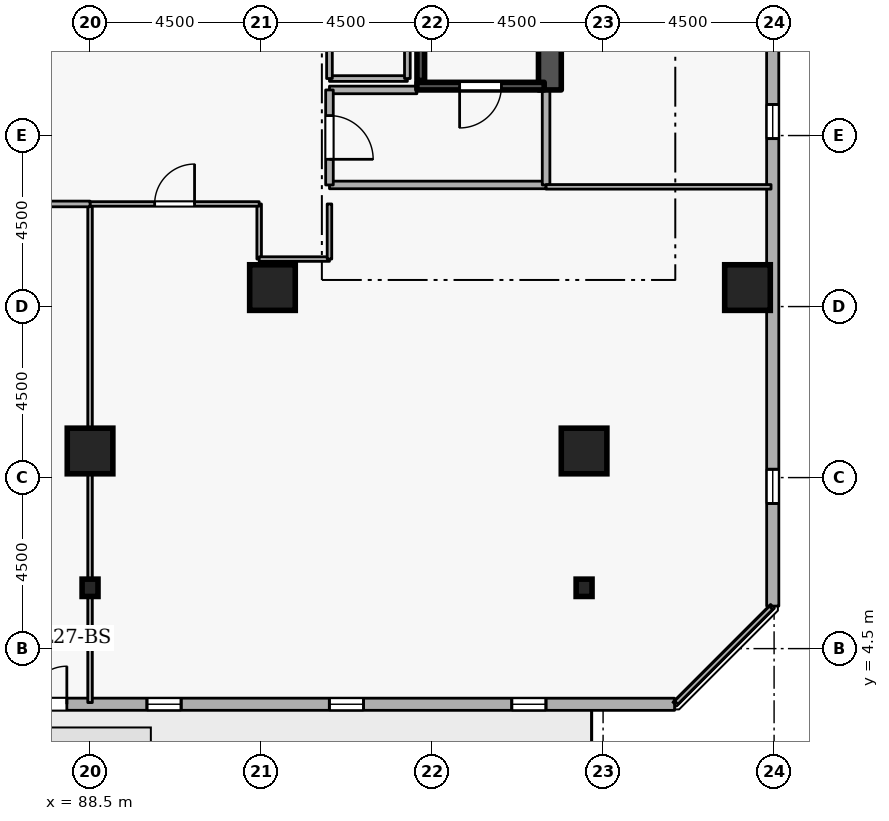
"""IFC4 building model, lengths in metres.
Left out: names, types, materials, properties, quantities, classifications, styles, units other than length and angle.
Written with IfcOpenShell. Run it as: python <this file> out.ifc"""

import sys

from ifc_helpers import new_model, si_unit, direction, frame, frame_2d, origin, origin_2d, place, context, subcontext, project, spatial, rectangle, i_section, extrude, element, fill, save


model = new_model("IFC4")
c1 = context("Model", 3, precision=1e-05, world=origin(), true_north=direction((0.0, 1.0)))
c2 = subcontext(c1, "Body", "Model", "MODEL_VIEW")
j1 = project(units=[si_unit("LENGTHUNIT", "METRE"), si_unit("PLANEANGLEUNIT", "RADIAN")], contexts=[c1])
p1 = place(None, origin())
s1 = spatial("IfcSite", under=j1, at=p1, CompositionType="ELEMENT")
p2 = place(p1, origin())
s2 = spatial("IfcBuilding", under=s1, at=p2, CompositionType="ELEMENT")
p3 = place(p2, frame((0.0, 0.0, 105.3)))
s3 = spatial("IfcBuildingStorey", under=s2, at=p3, CompositionType="ELEMENT", Elevation=105.3)
p4 = place(p3, frame((100.6, 19.2, 0.0), z_axis=(0.0, 0.0, 1.0), x_axis=(0.0, 1.0, 0.0)))
e1 = element("IfcWall", 1, at=p4, inside=s3, PredefinedType="SHEAR", context=c2, shape_type="SweptSolid", body=[
    extrude(rectangle(XDim=15.6, YDim=0.6, at=frame_2d((7.8, 0.0))), origin(), (0.0, 0.0, 1.0), 3.6),
])
for number, where, z_axis, x_axis in (
    (2, (105.8, 14.0, 0.0), (0.0, 0.0, 1.0), (1.0, 0.0, 0.0)),
    (3, (101.5, 9.7, 0.0), (0.0, 0.0, 1.0), (1.0, 0.0, 0.0)),
    (4, (88.5, 9.7, 0.0), (0.0, 0.0, 1.0), (1.0, 0.0, 0.0)),
    (5, (93.3, 14.0, 0.0), (0.0, 0.0, 1.0), (1.0, 0.0, 0.0)),
):
    element("IfcColumn", number, at=place(p3, frame(where, z_axis=z_axis, x_axis=x_axis)), inside=s3, PredefinedType="COLUMN", context=c2, shape_type="SweptSolid", body=[
        extrude(rectangle(XDim=1.2, YDim=1.2, at=origin_2d()), origin(), (0.0, 0.0, 1.0), 3.6),
    ])
for number, where, z_axis, x_axis in (
    (6, (101.5, 6.1, 0.0), (0.0, 0.0, 1.0), (1.0, 0.0, 0.0)),
    (7, (88.5, 6.1, 0.0), (0.0, 0.0, 1.0), (1.0, 0.0, 0.0)),
):
    element("IfcColumn", number, at=place(p3, frame(where, z_axis=z_axis, x_axis=x_axis)), inside=s3, PredefinedType="COLUMN", context=c2, shape_type="SweptSolid", body=[
        extrude(i_section(OverallWidth=0.418, OverallDepth=0.456, WebThickness=0.042, FlangeThickness=0.067, FilletRadius=0.015, at=origin_2d()), origin(), (0.0, 0.0, 1.0), 3.6),
    ])
p5 = place(p3, frame((68.097, 3.039, 0.0), z_axis=(0.0, 0.0, 1.0), x_axis=(0.999999996067, -8.8693006e-05, 0.0)))
e8 = element("IfcWall", 8, at=p5, inside=s3, PredefinedType="STANDARD", context=c2, shape_type="SweptSolid", body=[
    extrude(rectangle(XDim=35.784, YDim=0.32, at=frame_2d((17.892, 0.0))), origin(), (0.0, 0.0, 1.0), 2.7),
])
p6 = place(p5, frame((18.792, 0.0, 0.0)))
e9 = element("IfcOpeningElement", 9, at=p6, cuts=e8, PredefinedType="OPENING", context=c2, shape_type="SweptSolid", body=[
    extrude(rectangle(XDim=1.0, YDim=2.08, at=frame_2d((0.5, 1.04))), frame((0.0, 0.17, 0.0), z_axis=(0.0, -1.0, 0.0), x_axis=(1.0, 0.0, 0.0)), (0.0, 0.0, 1.0), 0.34),
])
p7 = place(p5, frame((2.7, 0.0, 0.72)))
e10 = element("IfcOpeningElement", 10, at=p7, cuts=e8, PredefinedType="OPENING", context=c2, shape_type="SweptSolid", body=[
    extrude(rectangle(XDim=0.9, YDim=1.75, at=frame_2d((0.45, 0.875))), frame((0.0, 0.17, 0.0), z_axis=(0.0, -1.0, 0.0), x_axis=(1.0, 0.0, 0.0)), (0.0, 0.0, 1.0), 0.34),
])
p8 = place(p5, frame((7.5, 0.0, 0.72)))
e11 = element("IfcOpeningElement", 11, at=p8, cuts=e8, PredefinedType="OPENING", context=c2, shape_type="SweptSolid", body=[
    extrude(rectangle(XDim=0.9, YDim=1.75, at=frame_2d((0.45, 0.875))), frame((0.0, 0.17, 0.0), z_axis=(0.0, -1.0, 0.0), x_axis=(1.0, 0.0, 0.0)), (0.0, 0.0, 1.0), 0.34),
])
p9 = place(p5, frame((12.3, 0.0, 0.72)))
e12 = element("IfcOpeningElement", 12, at=p9, cuts=e8, PredefinedType="OPENING", context=c2, shape_type="SweptSolid", body=[
    extrude(rectangle(XDim=0.9, YDim=1.75, at=frame_2d((0.45, 0.875))), frame((0.0, 0.17, 0.0), z_axis=(0.0, -1.0, 0.0), x_axis=(1.0, 0.0, 0.0)), (0.0, 0.0, 1.0), 0.34),
])
p10 = place(p5, frame((17.1, 0.0, 0.72)))
e13 = element("IfcOpeningElement", 13, at=p10, cuts=e8, PredefinedType="OPENING", context=c2, shape_type="SweptSolid", body=[
    extrude(rectangle(XDim=0.9, YDim=1.75, at=frame_2d((0.45, 0.875))), frame((0.0, 0.17, 0.0), z_axis=(0.0, -1.0, 0.0), x_axis=(1.0, 0.0, 0.0)), (0.0, 0.0, 1.0), 0.34),
])
p11 = place(p5, frame((21.9, 0.0, 0.72)))
e14 = element("IfcOpeningElement", 14, at=p11, cuts=e8, PredefinedType="OPENING", context=c2, shape_type="SweptSolid", body=[
    extrude(rectangle(XDim=0.9, YDim=1.75, at=frame_2d((0.45, 0.875))), frame((0.0, 0.17, 0.0), z_axis=(0.0, -1.0, 0.0), x_axis=(1.0, 0.0, 0.0)), (0.0, 0.0, 1.0), 0.34),
])
p12 = place(p5, frame((26.7, 0.0, 0.72)))
e15 = element("IfcOpeningElement", 15, at=p12, cuts=e8, PredefinedType="OPENING", context=c2, shape_type="SweptSolid", body=[
    extrude(rectangle(XDim=0.9, YDim=1.75, at=frame_2d((0.45, 0.875))), frame((0.0, 0.17, 0.0), z_axis=(0.0, -1.0, 0.0), x_axis=(1.0, 0.0, 0.0)), (0.0, 0.0, 1.0), 0.34),
])
p13 = place(p5, frame((31.5, 0.0, 0.72)))
e16 = element("IfcOpeningElement", 16, at=p13, cuts=e8, PredefinedType="OPENING", context=c2, shape_type="SweptSolid", body=[
    extrude(rectangle(XDim=0.9, YDim=1.75, at=frame_2d((0.45, 0.875))), frame((0.0, 0.17, 0.0), z_axis=(0.0, -1.0, 0.0), x_axis=(1.0, 0.0, 0.0)), (0.0, 0.0, 1.0), 0.34),
])
p14 = place(p3, frame((106.465, 5.619, 0.0), z_axis=(0.0, 0.0, 1.0), x_axis=(-8.8693006e-05, 0.999999996067, 0.0)))
e17 = element("IfcWall", 17, at=p14, inside=s3, PredefinedType="STANDARD", context=c2, shape_type="SweptSolid", body=[
    extrude(rectangle(XDim=35.784, YDim=0.32, at=frame_2d((17.892, 0.0))), origin(), (0.0, 0.0, 1.0), 2.7),
])
p15 = place(p14, frame((2.7, 0.0, 0.72)))
e18 = element("IfcOpeningElement", 18, at=p15, cuts=e17, PredefinedType="OPENING", context=c2, shape_type="SweptSolid", body=[
    extrude(rectangle(XDim=0.9, YDim=1.75, at=frame_2d((0.45, 0.875))), frame((0.0, 0.17, 0.0), z_axis=(0.0, -1.0, 0.0), x_axis=(1.0, 0.0, 0.0)), (0.0, 0.0, 1.0), 0.34),
])
p16 = place(p14, frame((12.3, 0.0, 0.72)))
e19 = element("IfcOpeningElement", 19, at=p16, cuts=e17, PredefinedType="OPENING", context=c2, shape_type="SweptSolid", body=[
    extrude(rectangle(XDim=0.9, YDim=1.75, at=frame_2d((0.45, 0.875))), frame((0.0, 0.17, 0.0), z_axis=(0.0, -1.0, 0.0), x_axis=(1.0, 0.0, 0.0)), (0.0, 0.0, 1.0), 0.34),
])
p17 = place(p14, frame((17.1, 0.0, 0.72)))
e20 = element("IfcOpeningElement", 20, at=p17, cuts=e17, PredefinedType="OPENING", context=c2, shape_type="SweptSolid", body=[
    extrude(rectangle(XDim=0.9, YDim=1.75, at=frame_2d((0.45, 0.875))), frame((0.0, 0.17, 0.0), z_axis=(0.0, -1.0, 0.0), x_axis=(1.0, 0.0, 0.0)), (0.0, 0.0, 1.0), 0.34),
])
p18 = place(p14, frame((26.7, 0.0, 0.72)))
e21 = element("IfcOpeningElement", 21, at=p18, cuts=e17, PredefinedType="OPENING", context=c2, shape_type="SweptSolid", body=[
    extrude(rectangle(XDim=0.9, YDim=1.75, at=frame_2d((0.45, 0.875))), frame((0.0, 0.17, 0.0), z_axis=(0.0, -1.0, 0.0), x_axis=(1.0, 0.0, 0.0)), (0.0, 0.0, 1.0), 0.34),
])
p19 = place(p14, frame((31.5, 0.0, 0.72)))
e22 = element("IfcOpeningElement", 22, at=p19, cuts=e17, PredefinedType="OPENING", context=c2, shape_type="SweptSolid", body=[
    extrude(rectangle(XDim=0.9, YDim=1.75, at=frame_2d((0.45, 0.875))), frame((0.0, 0.17, 0.0), z_axis=(0.0, -1.0, 0.0), x_axis=(1.0, 0.0, 0.0)), (0.0, 0.0, 1.0), 0.34),
])
p20 = place(p3, frame((100.45, 19.3, 0.0), z_axis=(0.0, 0.0, 1.0), x_axis=(-1.0, 0.0, 0.0)))
e23 = element("IfcWall", 23, at=p20, inside=s3, PredefinedType="SHEAR", context=c2, shape_type="SweptSolid", body=[
    extrude(rectangle(XDim=3.35, YDim=0.2, at=frame_2d((1.675, 0.0))), origin(), (0.0, 0.0, 1.0), 3.6),
])
p21 = place(p20, frame((1.125, 0.0, 0.0)))
e24 = element("IfcOpeningElement", 24, at=p21, cuts=e23, PredefinedType="OPENING", context=c2, shape_type="SweptSolid", body=[
    extrude(rectangle(XDim=1.1, YDim=2.1, at=frame_2d((0.55, 1.05))), frame((0.0, 0.11, 0.0), z_axis=(0.0, -1.0, 0.0), x_axis=(1.0, 0.0, 0.0)), (0.0, 0.0, 1.0), 0.22),
])
p22 = place(p3, frame((97.203, 26.55, 0.0), z_axis=(0.0, 0.0, 1.0), x_axis=(0.0, -1.0, 0.0)))
e25 = element("IfcWall", 25, at=p22, inside=s3, PredefinedType="SHEAR", context=c2, shape_type="SweptSolid", body=[
    extrude(rectangle(XDim=7.1, YDim=0.2, at=frame_2d((3.55, 0.0))), origin(), (0.0, 0.0, 1.0), 3.6),
])
p23 = place(p3, frame((94.8, 16.7, 0.0), z_axis=(0.0, 0.0, 1.0), x_axis=(1.0, 0.0, 0.0)))
e26 = element("IfcWall", 26, at=p23, inside=s3, PredefinedType="STANDARD", context=c2, shape_type="SweptSolid", body=[
    extrude(rectangle(XDim=5.7, YDim=0.2, at=frame_2d((2.85, 0.0))), origin(), (0.0, 0.0, 1.0), 3.34),
])
p24 = place(p3, frame((100.5, 16.7, 0.0), z_axis=(0.0, 0.0, 1.0), x_axis=(0.0, 1.0, 0.0)))
e27 = element("IfcWall", 27, at=p24, inside=s3, PredefinedType="STANDARD", context=c2, shape_type="SweptSolid", body=[
    extrude(rectangle(XDim=2.5, YDim=0.2, at=frame_2d((1.25, 0.0))), origin(), (0.0, 0.0, 1.0), 3.34),
])
p25 = place(p3, frame((97.1, 19.2, 0.0), z_axis=(0.0, 0.0, 1.0), x_axis=(-1.0, 0.0, 0.0)))
e28 = element("IfcWall", 28, at=p25, inside=s3, PredefinedType="STANDARD", context=c2, shape_type="SweptSolid", body=[
    extrude(rectangle(XDim=2.3, YDim=0.2, at=frame_2d((1.15, 0.0))), origin(), (0.0, 0.0, 1.0), 2.545),
])
p26 = place(p3, frame((94.8, 19.2, 0.0), z_axis=(0.0, 0.0, 1.0), x_axis=(0.0, -1.0, 0.0)))
e29 = element("IfcWall", 29, at=p26, inside=s3, PredefinedType="STANDARD", context=c2, shape_type="SweptSolid", body=[
    extrude(rectangle(XDim=2.5, YDim=0.2, at=frame_2d((1.25, 0.0))), origin(), (0.0, 0.0, 1.0), 3.34),
])
p27 = place(p26, frame((0.675, 0.0, 0.0)))
e30 = element("IfcOpeningElement", 30, at=p27, cuts=e29, PredefinedType="OPENING", context=c2, shape_type="SweptSolid", body=[
    extrude(rectangle(XDim=1.15, YDim=2.1, at=frame_2d((0.575, 1.05))), frame((0.0, 0.11, 0.0), z_axis=(0.0, -1.0, 0.0), x_axis=(1.0, 0.0, 0.0)), (0.0, 0.0, 1.0), 0.22),
])
p28 = place(p3, frame((94.8, 19.5, 0.0), z_axis=(0.0, 0.0, 1.0), x_axis=(1.0, 0.0, 0.0)))
e31 = element("IfcWall", 31, at=p28, inside=s3, PredefinedType="PARTITIONING", context=c2, shape_type="SweptSolid", body=[
    extrude(rectangle(XDim=2.05, YDim=0.15, at=frame_2d((1.025, 0.0))), origin(), (0.0, 0.0, 1.0), 2.545),
])
p29 = place(p3, frame((96.85, 19.5, 0.0), z_axis=(0.0, 0.0, 1.0), x_axis=(0.0, 1.0, 0.0)))
e32 = element("IfcWall", 32, at=p29, inside=s3, PredefinedType="PARTITIONING", context=c2, shape_type="SweptSolid", body=[
    extrude(rectangle(XDim=2.6, YDim=0.15, at=frame_2d((1.3, 0.0))), origin(), (0.0, 0.0, 1.0), 3.34),
])
p30 = place(p3, frame((94.8, 22.1, 0.0), z_axis=(0.0, 0.0, 1.0), x_axis=(0.0, -1.0, 0.0)))
e33 = element("IfcWall", 33, at=p30, inside=s3, PredefinedType="PARTITIONING", context=c2, shape_type="SweptSolid", body=[
    extrude(rectangle(XDim=2.6, YDim=0.15, at=frame_2d((1.3, 0.0))), origin(), (0.0, 0.0, 1.0), 3.34),
])
p31 = place(p30, frame((0.84, 0.0, 0.0)))
e34 = element("IfcOpeningElement", 34, at=p31, cuts=e33, PredefinedType="OPENING", context=c2, shape_type="SweptSolid", body=[
    extrude(rectangle(XDim=0.92, YDim=2.08, at=frame_2d((0.46, 1.04))), frame((0.0, 0.085, 0.0), z_axis=(0.0, -1.0, 0.0), x_axis=(1.0, 0.0, 0.0)), (0.0, 0.0, 1.0), 0.17),
])
p32 = place(p3, frame((92.95, 16.2, 0.0), z_axis=(0.0, 0.0, 1.0), x_axis=(0.0, -1.0, 0.0)))
e35 = element("IfcWall", 35, at=p32, inside=s3, PredefinedType="PARTITIONING", context=c2, shape_type="SweptSolid", body=[
    extrude(rectangle(XDim=1.45, YDim=0.12, at=frame_2d((0.725, 0.0))), origin(), (0.0, 0.0, 1.0), 3.34),
])
p33 = place(p3, frame((92.95, 14.75, 0.0), z_axis=(0.0, 0.0, 1.0), x_axis=(1.0, 0.0, 0.0)))
e36 = element("IfcWall", 36, at=p33, inside=s3, PredefinedType="PARTITIONING", context=c2, shape_type="SweptSolid", body=[
    extrude(rectangle(XDim=1.85, YDim=0.12, at=frame_2d((0.925, 0.0))), origin(), (0.0, 0.0, 1.0), 3.34),
])
p34 = place(p3, frame((94.8, 14.75, 0.0), z_axis=(0.0, 0.0, 1.0), x_axis=(0.0, 1.0, 0.0)))
e37 = element("IfcWall", 37, at=p34, inside=s3, PredefinedType="PARTITIONING", context=c2, shape_type="SweptSolid", body=[
    extrude(rectangle(XDim=1.45, YDim=0.12, at=frame_2d((0.725, 0.0))), origin(), (0.0, 0.0, 1.0), 3.34),
])
p35 = place(p3, frame((100.5, 16.65, 0.0), z_axis=(0.0, 0.0, 1.0), x_axis=(1.0, 0.0, 0.0)))
e38 = element("IfcWall", 38, at=p35, inside=s3, PredefinedType="PARTITIONING", context=c2, shape_type="SweptSolid", body=[
    extrude(rectangle(XDim=5.92, YDim=0.12, at=frame_2d((2.96, 0.0))), origin(), (0.0, 0.0, 1.0), 3.34),
])
p36 = place(p3, frame((106.42, 5.575, 0.0), z_axis=(0.0, 0.0, 1.0), x_axis=(-0.707106781187, -0.707106781187, 0.0)))
e39 = element("IfcWall", 39, at=p36, inside=s3, PredefinedType="PARTITIONING", context=c2, shape_type="SweptSolid", body=[
    extrude(rectangle(XDim=3.528, YDim=0.12, at=frame_2d((1.764, 0.0))), origin(), (0.0, 0.0, 1.0), 3.34),
])
p37 = place(p3, frame((88.5, 3.08, 0.0), z_axis=(0.0, 0.0, 1.0), x_axis=(0.0, 1.0, 0.0)))
e40 = element("IfcWall", 40, at=p37, inside=s3, PredefinedType="PARTITIONING", context=c2, shape_type="SweptSolid", body=[
    extrude(rectangle(XDim=13.12, YDim=0.12, at=frame_2d((6.56, 0.0))), origin(), (0.0, 0.0, 1.0), 2.878),
])
p38 = place(p3, frame((88.5, 16.2, 0.0), z_axis=(0.0, 0.0, 1.0), x_axis=(1.0, 0.0, 0.0)))
e41 = element("IfcWall", 41, at=p38, inside=s3, PredefinedType="PARTITIONING", context=c2, shape_type="SweptSolid", body=[
    extrude(rectangle(XDim=4.45, YDim=0.12, at=frame_2d((2.225, 0.0))), origin(), (0.0, 0.0, 1.0), 3.34),
])
p39 = place(p38, frame((1.7, 0.0, 0.0)))
e42 = element("IfcOpeningElement", 42, at=p39, cuts=e41, PredefinedType="OPENING", context=c2, shape_type="SweptSolid", body=[
    extrude(rectangle(XDim=1.05, YDim=2.1, at=frame_2d((0.525, 1.05))), frame((0.0, 0.07, 0.0), z_axis=(0.0, -1.0, 0.0), x_axis=(1.0, 0.0, 0.0)), (0.0, 0.0, 1.0), 0.14),
])
p40 = place(p3, frame((84.05, 16.2, 0.0), z_axis=(0.0, 0.0, 1.0), x_axis=(1.0, 0.0, 0.0)))
e43 = element("IfcWall", 43, at=p40, inside=s3, PredefinedType="PARTITIONING", context=c2, shape_type="SweptSolid", body=[
    extrude(rectangle(XDim=4.45, YDim=0.15, at=frame_2d((2.225, 0.0))), origin(), (0.0, 0.0, 1.0), 3.34),
])
p41 = place(p40, frame((1.575, 0.0, 0.0)))
e44 = element("IfcOpeningElement", 44, at=p41, cuts=e43, PredefinedType="OPENING", context=c2, shape_type="SweptSolid", body=[
    extrude(rectangle(XDim=1.3, YDim=2.12, at=frame_2d((0.65, 1.06))), frame((0.0, 0.085, 0.0), z_axis=(0.0, -1.0, 0.0), x_axis=(1.0, 0.0, 0.0)), (0.0, 0.0, 1.0), 0.17),
])
p42 = place(p6, origin())
e45 = element("IfcDoor", 45, at=p42, inside=s3, OperationType="SINGLE_SWING_RIGHT", PredefinedType="DOOR", context=c2, shape_type="SweptSolid", body=[
    extrude(rectangle(XDim=1.0, YDim=2.08, at=frame_2d((0.5, 1.04))), frame((0.0, 0.025, 0.0), z_axis=(0.0, -1.0, 0.0), x_axis=(1.0, 0.0, 0.0)), (0.0, 0.0, 1.0), 0.05),
])
fill(e9, e45)
p43 = place(p11, origin())
e46 = element("IfcWindow", 46, at=p43, inside=s3, PartitioningType="SINGLE_PANEL", PredefinedType="WINDOW", context=c2, shape_type="SweptSolid", body=[
    extrude(rectangle(XDim=0.9, YDim=1.75, at=frame_2d((0.45, 0.875))), frame((0.0, 0.03, 0.0), z_axis=(0.0, -1.0, 0.0), x_axis=(1.0, 0.0, 0.0)), (0.0, 0.0, 1.0), 0.06),
])
fill(e14, e46)
p44 = place(p12, origin())
e47 = element("IfcWindow", 47, at=p44, inside=s3, PartitioningType="SINGLE_PANEL", PredefinedType="WINDOW", context=c2, shape_type="SweptSolid", body=[
    extrude(rectangle(XDim=0.9, YDim=1.75, at=frame_2d((0.45, 0.875))), frame((0.0, 0.03, 0.0), z_axis=(0.0, -1.0, 0.0), x_axis=(1.0, 0.0, 0.0)), (0.0, 0.0, 1.0), 0.06),
])
fill(e15, e47)
p45 = place(p13, origin())
e48 = element("IfcWindow", 48, at=p45, inside=s3, PartitioningType="SINGLE_PANEL", PredefinedType="WINDOW", context=c2, shape_type="SweptSolid", body=[
    extrude(rectangle(XDim=0.9, YDim=1.75, at=frame_2d((0.45, 0.875))), frame((0.0, 0.03, 0.0), z_axis=(0.0, -1.0, 0.0), x_axis=(1.0, 0.0, 0.0)), (0.0, 0.0, 1.0), 0.06),
])
fill(e16, e48)
p46 = place(p15, origin())
e49 = element("IfcWindow", 49, at=p46, inside=s3, PartitioningType="SINGLE_PANEL", PredefinedType="WINDOW", context=c2, shape_type="SweptSolid", body=[
    extrude(rectangle(XDim=0.9, YDim=1.75, at=frame_2d((0.45, 0.875))), frame((0.0, 0.03, 0.0), z_axis=(0.0, -1.0, 0.0), x_axis=(1.0, 0.0, 0.0)), (0.0, 0.0, 1.0), 0.06),
])
fill(e18, e49)
p47 = place(p16, origin())
e50 = element("IfcWindow", 50, at=p47, inside=s3, PartitioningType="SINGLE_PANEL", PredefinedType="WINDOW", context=c2, shape_type="SweptSolid", body=[
    extrude(rectangle(XDim=0.9, YDim=1.75, at=frame_2d((0.45, 0.875))), frame((0.0, 0.03, 0.0), z_axis=(0.0, -1.0, 0.0), x_axis=(1.0, 0.0, 0.0)), (0.0, 0.0, 1.0), 0.06),
])
fill(e19, e50)
p48 = place(p21, origin())
e51 = element("IfcDoor", 51, at=p48, inside=s3, OperationType="SINGLE_SWING_RIGHT", PredefinedType="DOOR", context=c2, shape_type="SweptSolid", body=[
    extrude(rectangle(XDim=1.1, YDim=2.1, at=frame_2d((0.55, 1.05))), frame((0.0, 0.025, 0.0), z_axis=(0.0, -1.0, 0.0), x_axis=(1.0, 0.0, 0.0)), (0.0, 0.0, 1.0), 0.05),
])
fill(e24, e51)
p49 = place(p27, origin())
e52 = element("IfcDoor", 52, at=p49, inside=s3, OperationType="SINGLE_SWING_RIGHT", PredefinedType="DOOR", context=c2, shape_type="SweptSolid", body=[
    extrude(rectangle(XDim=1.15, YDim=2.1, at=frame_2d((0.575, 1.05))), frame((0.0, 0.025, 0.0), z_axis=(0.0, -1.0, 0.0), x_axis=(1.0, 0.0, 0.0)), (0.0, 0.0, 1.0), 0.05),
])
fill(e30, e52)
p50 = place(p39, origin())
e53 = element("IfcDoor", 53, at=p50, inside=s3, OperationType="SINGLE_SWING_RIGHT", PredefinedType="DOOR", context=c2, shape_type="SweptSolid", body=[
    extrude(rectangle(XDim=1.05, YDim=2.1, at=frame_2d((0.525, 1.05))), frame((0.0, 0.025, 0.0), z_axis=(0.0, -1.0, 0.0), x_axis=(1.0, 0.0, 0.0)), (0.0, 0.0, 1.0), 0.05),
])
fill(e42, e53)
save(model, sys.argv[1])
